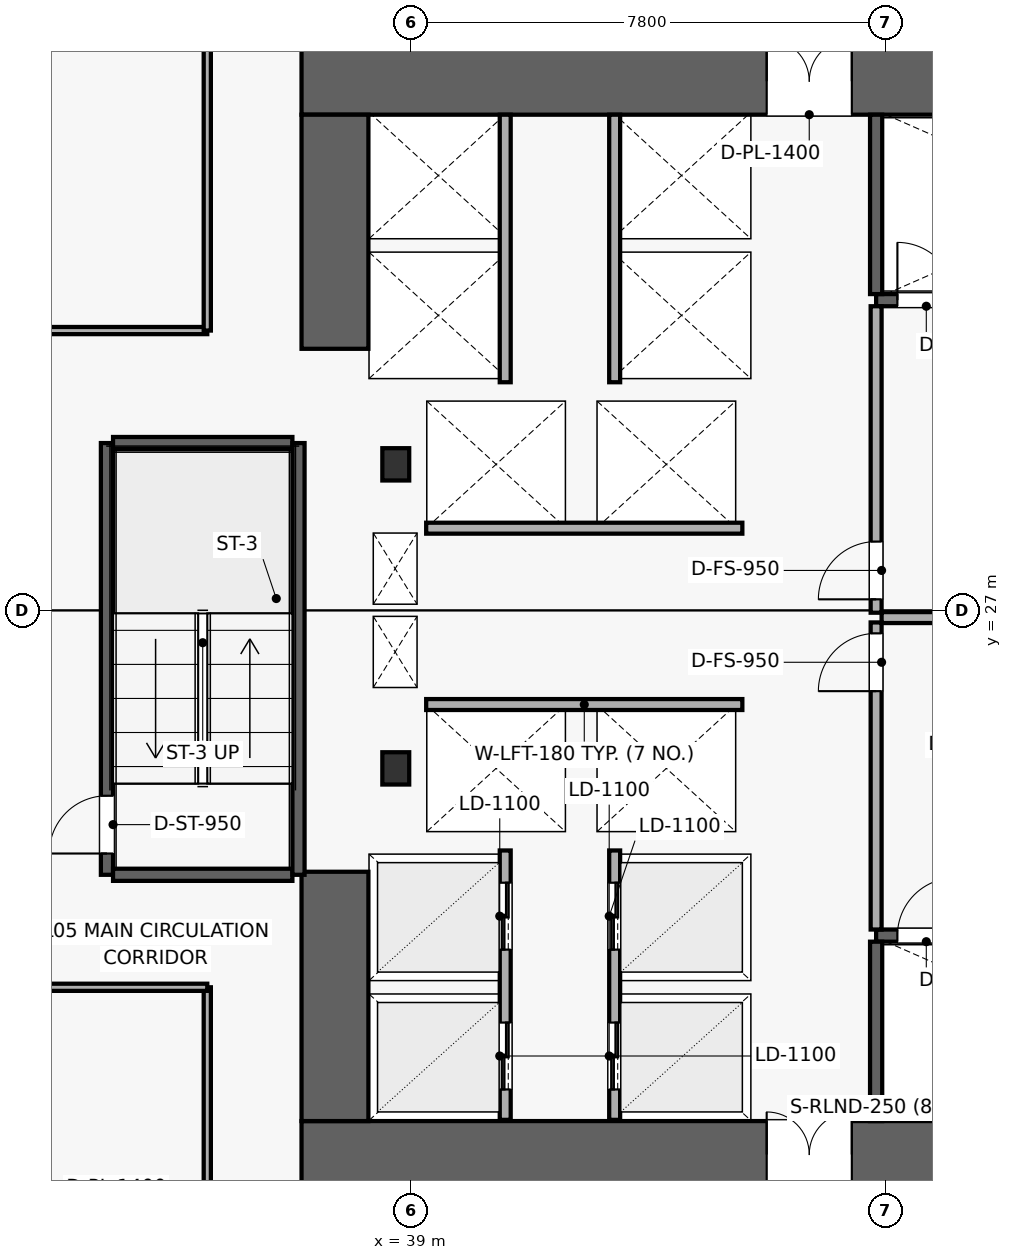
"""IFC4 building model, lengths in metres.
Left out: names, types, materials, properties, quantities, classifications, styles, units other than length and angle.
Written with IfcOpenShell. Run it as: python <this file> out.ifc"""

import sys

from ifc_helpers import new_model, si_unit, direction, frame, frame_2d, origin, origin_2d, place, context, subcontext, project, spatial, rectangle, i_section, extrude, element, fill, save


model = new_model("IFC4")
c1 = context("Model", 3, precision=1e-05, world=origin(), true_north=direction((0.0, 1.0)))
c2 = subcontext(c1, "Body", "Model", "MODEL_VIEW")
j1 = project(units=[si_unit("LENGTHUNIT", "METRE"), si_unit("PLANEANGLEUNIT", "RADIAN")], contexts=[c1])
p1 = place(None, origin())
s1 = spatial("IfcSite", under=j1, at=p1, CompositionType="ELEMENT")
p2 = place(p1, origin())
s2 = spatial("IfcBuilding", under=s1, at=p2, CompositionType="ELEMENT")
p3 = place(p2, frame((0.0, 0.0, 24.0)))
s3 = spatial("IfcBuildingStorey", under=s2, at=p3, CompositionType="ELEMENT", Elevation=24.0)
p4 = place(p3, frame((37.2, 18.05, 0.0), z_axis=(0.0, 0.0, 1.0), x_axis=(1.0, 0.0, 0.0)))
e1 = element("IfcWall", 1, at=p4, inside=s3, PredefinedType="SHEAR", context=c2, shape_type="SweptSolid", body=[
    extrude(rectangle(XDim=19.2, YDim=1.1, at=frame_2d((9.6, 0.0))), origin(), (0.0, 0.0, 1.0), 3.58),
])
p5 = place(p4, frame((7.65, 0.0, 0.0)))
e2 = element("IfcOpeningElement", 2, at=p5, cuts=e1, PredefinedType="OPENING", context=c2, shape_type="SweptSolid", body=[
    extrude(rectangle(XDim=1.4, YDim=2.15, at=frame_2d((0.7, 1.075))), frame((0.0, 0.56, 0.0), z_axis=(0.0, -1.0, 0.0), x_axis=(1.0, 0.0, 0.0)), (0.0, 0.0, 1.0), 1.12),
])
p6 = place(p3, frame((37.2, 35.7, 0.0), z_axis=(0.0, 0.0, 1.0), x_axis=(1.0, 0.0, 0.0)))
e3 = element("IfcWall", 3, at=p6, inside=s3, PredefinedType="SHEAR", context=c2, shape_type="SweptSolid", body=[
    extrude(rectangle(XDim=19.2, YDim=1.1, at=frame_2d((9.6, 0.0))), origin(), (0.0, 0.0, 1.0), 3.58),
])
p7 = place(p6, frame((7.65, 0.0, 0.0)))
e4 = element("IfcOpeningElement", 4, at=p7, cuts=e3, PredefinedType="OPENING", context=c2, shape_type="SweptSolid", body=[
    extrude(rectangle(XDim=1.4, YDim=2.15, at=frame_2d((0.7, 1.075))), frame((0.0, 0.56, 0.0), z_axis=(0.0, -1.0, 0.0), x_axis=(1.0, 0.0, 0.0)), (0.0, 0.0, 1.0), 1.12),
])
p8 = place(p3, frame((37.75, 18.6, 0.0), z_axis=(0.0, 0.0, 1.0), x_axis=(0.0, 1.0, 0.0)))
e5 = element("IfcWall", 5, at=p8, inside=s3, PredefinedType="SHEAR", context=c2, shape_type="SweptSolid", body=[
    extrude(rectangle(XDim=4.1, YDim=1.1, at=frame_2d((2.05, 0.0))), origin(), (0.0, 0.0, 1.0), 3.58),
])
p9 = place(p3, frame((37.75, 31.3, 0.0), z_axis=(0.0, 0.0, 1.0), x_axis=(0.0, 1.0, 0.0)))
e6 = element("IfcWall", 6, at=p9, inside=s3, PredefinedType="SHEAR", context=c2, shape_type="SweptSolid", body=[
    extrude(rectangle(XDim=3.85, YDim=1.1, at=frame_2d((1.925, 0.0))), origin(), (0.0, 0.0, 1.0), 3.58),
])
for number, where, z_axis, x_axis in (
    (7, (38.75, 24.4, 0.005), (0.0, 0.0, 1.0), (1.0, 0.0, 0.0)),
    (8, (38.75, 29.4, 0.005), (0.0, 0.0, 1.0), (1.0, 0.0, 0.0)),
):
    element("IfcColumn", number, at=place(p3, frame(where, z_axis=z_axis, x_axis=x_axis)), inside=s3, PredefinedType="COLUMN", context=c2, shape_type="SweptSolid", body=[
        extrude(i_section(OverallWidth=0.442, OverallDepth=0.531, WebThickness=0.066, FlangeThickness=0.106, FilletRadius=0.031, at=origin_2d()), origin(), (0.0, 0.0, 1.0), 3.795),
    ])
p10 = place(p3, frame((46.65, 21.65, 0.0), z_axis=(0.0, 0.0, 1.0), x_axis=(1.0, 0.0, 0.0)))
e9 = element("IfcWall", 9, at=p10, inside=s3, PredefinedType="SHEAR", context=c2, shape_type="SweptSolid", body=[
    extrude(rectangle(XDim=7.1, YDim=0.2, at=frame_2d((3.55, 0.0))), origin(), (0.0, 0.0, 1.0), 3.58),
])
p11 = place(p10, frame((0.35, 0.0, 0.0)))
e10 = element("IfcOpeningElement", 10, at=p11, cuts=e9, PredefinedType="OPENING", context=c2, shape_type="SweptSolid", body=[
    extrude(rectangle(XDim=0.95, YDim=2.1, at=frame_2d((0.475, 1.05))), frame((0.0, 0.11, 0.0), z_axis=(0.0, -1.0, 0.0), x_axis=(1.0, 0.0, 0.0)), (0.0, 0.0, 1.0), 0.22),
])
p12 = place(p3, frame((46.65, 18.6, 0.0), z_axis=(0.0, 0.0, 1.0), x_axis=(0.0, 1.0, 0.0)))
e11 = element("IfcWall", 11, at=p12, inside=s3, PredefinedType="SHEAR", context=c2, shape_type="SweptSolid", body=[
    extrude(rectangle(XDim=2.95, YDim=0.2, at=frame_2d((1.475, 0.0))), origin(), (0.0, 0.0, 1.0), 3.58),
])
p13 = place(p3, frame((46.65, 32.1, 0.0), z_axis=(0.0, 0.0, 1.0), x_axis=(1.0, 0.0, 0.0)))
e12 = element("IfcWall", 12, at=p13, inside=s3, PredefinedType="SHEAR", context=c2, shape_type="SweptSolid", body=[
    extrude(rectangle(XDim=7.1, YDim=0.2, at=frame_2d((3.55, 0.0))), origin(), (0.0, 0.0, 1.0), 3.58),
])
p14 = place(p13, frame((0.35, 0.0, 0.0)))
e13 = element("IfcOpeningElement", 13, at=p14, cuts=e12, PredefinedType="OPENING", context=c2, shape_type="SweptSolid", body=[
    extrude(rectangle(XDim=0.95, YDim=2.1, at=frame_2d((0.475, 1.05))), frame((0.0, 0.11, 0.0), z_axis=(0.0, -1.0, 0.0), x_axis=(1.0, 0.0, 0.0)), (0.0, 0.0, 1.0), 0.22),
])
p15 = place(p3, frame((46.65, 32.2, 0.0), z_axis=(0.0, 0.0, 1.0), x_axis=(0.0, 1.0, 0.0)))
e14 = element("IfcWall", 14, at=p15, inside=s3, PredefinedType="SHEAR", context=c2, shape_type="SweptSolid", body=[
    extrude(rectangle(XDim=2.95, YDim=0.2, at=frame_2d((1.475, 0.0))), origin(), (0.0, 0.0, 1.0), 3.58),
])
p16 = place(p3, frame((34.0, 22.65, 0.0), z_axis=(0.0, 0.0, 1.0), x_axis=(0.0, 1.0, 0.0)))
e15 = element("IfcWall", 15, at=p16, inside=s3, PredefinedType="SHEAR", context=c2, shape_type="SweptSolid", body=[
    extrude(rectangle(XDim=7.1, YDim=0.2, at=frame_2d((3.55, 0.0))), origin(), (0.0, 0.0, 1.0), 3.58),
])
p17 = place(p16, frame((0.35, 0.0, 0.0)))
e16 = element("IfcOpeningElement", 16, at=p17, cuts=e15, PredefinedType="OPENING", context=c2, shape_type="SweptSolid", body=[
    extrude(rectangle(XDim=0.95, YDim=2.1, at=frame_2d((0.475, 1.05))), frame((0.0, 0.11, 0.0), z_axis=(0.0, -1.0, 0.0), x_axis=(1.0, 0.0, 0.0)), (0.0, 0.0, 1.0), 0.22),
])
for number, where, z_axis, x_axis in (
    (17, (34.1, 22.65, 0.0), (0.0, 0.0, 1.0), (1.0, 0.0, 0.0)),
    (18, (34.1, 29.75, 0.0), (0.0, 0.0, 1.0), (1.0, 0.0, 0.0)),
):
    element("IfcWall", number, at=place(p3, frame(where, z_axis=z_axis, x_axis=x_axis)), inside=s3, PredefinedType="SHEAR", context=c2, shape_type="SweptSolid", body=[
        extrude(rectangle(XDim=2.95, YDim=0.2, at=frame_2d((1.475, 0.0))), origin(), (0.0, 0.0, 1.0), 3.58),
    ])
p18 = place(p3, frame((37.15, 22.65, 0.0), z_axis=(0.0, 0.0, 1.0), x_axis=(0.0, 1.0, 0.0)))
e19 = element("IfcWall", 19, at=p18, inside=s3, PredefinedType="SHEAR", context=c2, shape_type="SweptSolid", body=[
    extrude(rectangle(XDim=7.1, YDim=0.2, at=frame_2d((3.55, 0.0))), origin(), (0.0, 0.0, 1.0), 3.58),
])
p19 = place(p3, frame((46.74, 26.88, 0.0), z_axis=(0.0, 0.0, 1.0), x_axis=(1.0, 0.0, 0.0)))
e20 = element("IfcWall", 20, at=p19, inside=s3, PredefinedType="PARTITIONING", context=c2, shape_type="SweptSolid", body=[
    extrude(rectangle(XDim=3.17, YDim=0.18, at=frame_2d((1.585, 0.0))), origin(), (0.0, 0.0, 1.0), 3.58),
])
p20 = place(p3, frame((46.65, 21.75, 0.0), z_axis=(0.0, 0.0, 1.0), x_axis=(0.0, 1.0, 0.0)))
e21 = element("IfcWall", 21, at=p20, inside=s3, PredefinedType="PARTITIONING", context=c2, shape_type="SweptSolid", body=[
    extrude(rectangle(XDim=5.05, YDim=0.18, at=frame_2d((2.525, 0.0))), origin(), (0.0, 0.0, 1.0), 2.958),
])
p21 = place(p20, frame((3.92, 0.0, 0.0)))
e22 = element("IfcOpeningElement", 22, at=p21, cuts=e21, PredefinedType="OPENING", context=c2, shape_type="SweptSolid", body=[
    extrude(rectangle(XDim=0.95, YDim=2.1, at=frame_2d((0.475, 1.05))), frame((0.0, 0.1, 0.0), z_axis=(0.0, -1.0, 0.0), x_axis=(1.0, 0.0, 0.0)), (0.0, 0.0, 1.0), 0.2),
])
p22 = place(p3, frame((46.65, 26.96, 0.0), z_axis=(0.0, 0.0, 1.0), x_axis=(0.0, 1.0, 0.0)))
e23 = element("IfcWall", 23, at=p22, inside=s3, PredefinedType="PARTITIONING", context=c2, shape_type="SweptSolid", body=[
    extrude(rectangle(XDim=5.04, YDim=0.18, at=frame_2d((2.52, 0.0))), origin(), (0.0, 0.0, 1.0), 2.958),
])
p23 = place(p22, frame((0.22, 0.0, 0.0)))
e24 = element("IfcOpeningElement", 24, at=p23, cuts=e23, PredefinedType="OPENING", context=c2, shape_type="SweptSolid", body=[
    extrude(rectangle(XDim=0.95, YDim=2.1, at=frame_2d((0.475, 1.05))), frame((0.0, 0.1, 0.0), z_axis=(0.0, -1.0, 0.0), x_axis=(1.0, 0.0, 0.0)), (0.0, 0.0, 1.0), 0.2),
])
p24 = place(p3, frame((40.55, 18.62, 0.0), z_axis=(0.0, 0.0, 1.0), x_axis=(0.0, 1.0, 0.0)))
e25 = element("IfcWall", 25, at=p24, inside=s3, PredefinedType="SOLIDWALL", context=c2, shape_type="SweptSolid", body=[
    extrude(rectangle(XDim=4.43, YDim=0.18, at=frame_2d((2.215, 0.0))), origin(), (0.0, 0.0, 1.0), 3.58),
])
p25 = place(p24, frame((0.5, 0.0, 0.0)))
e26 = element("IfcOpeningElement", 26, at=p25, cuts=e25, PredefinedType="OPENING", context=c2, shape_type="SweptSolid", body=[
    extrude(rectangle(XDim=1.1, YDim=2.15, at=frame_2d((0.55, 1.075))), frame((0.0, 0.1, 0.0), z_axis=(0.0, -1.0, 0.0), x_axis=(1.0, 0.0, 0.0)), (0.0, 0.0, 1.0), 0.2),
])
p26 = place(p24, frame((2.8, 0.0, 0.0)))
e27 = element("IfcOpeningElement", 27, at=p26, cuts=e25, PredefinedType="OPENING", context=c2, shape_type="SweptSolid", body=[
    extrude(rectangle(XDim=1.1, YDim=2.15, at=frame_2d((0.55, 1.075))), frame((0.0, 0.1, 0.0), z_axis=(0.0, -1.0, 0.0), x_axis=(1.0, 0.0, 0.0)), (0.0, 0.0, 1.0), 0.2),
])
p27 = place(p3, frame((42.35, 18.62, 0.0), z_axis=(0.0, 0.0, 1.0), x_axis=(0.0, 1.0, 0.0)))
e28 = element("IfcWall", 28, at=p27, inside=s3, PredefinedType="SOLIDWALL", context=c2, shape_type="SweptSolid", body=[
    extrude(rectangle(XDim=4.43, YDim=0.18, at=frame_2d((2.215, 0.0))), origin(), (0.0, 0.0, 1.0), 3.58),
])
p28 = place(p27, frame((0.5, 0.0, 0.0)))
e29 = element("IfcOpeningElement", 29, at=p28, cuts=e28, PredefinedType="OPENING", context=c2, shape_type="SweptSolid", body=[
    extrude(rectangle(XDim=1.1, YDim=2.15, at=frame_2d((0.55, 1.075))), frame((0.0, 0.1, 0.0), z_axis=(0.0, -1.0, 0.0), x_axis=(1.0, 0.0, 0.0)), (0.0, 0.0, 1.0), 0.2),
])
p29 = place(p27, frame((2.8, 0.0, 0.0)))
e30 = element("IfcOpeningElement", 30, at=p29, cuts=e28, PredefinedType="OPENING", context=c2, shape_type="SweptSolid", body=[
    extrude(rectangle(XDim=1.1, YDim=2.15, at=frame_2d((0.55, 1.075))), frame((0.0, 0.1, 0.0), z_axis=(0.0, -1.0, 0.0), x_axis=(1.0, 0.0, 0.0)), (0.0, 0.0, 1.0), 0.2),
])
for number, where, z_axis, x_axis in (
    (31, (40.55, 30.75, 0.0), (0.0, 0.0, 1.0), (0.0, 1.0, 0.0)),
    (32, (42.35, 30.75, 0.0), (0.0, 0.0, 1.0), (0.0, 1.0, 0.0)),
):
    element("IfcWall", number, at=place(p3, frame(where, z_axis=z_axis, x_axis=x_axis)), inside=s3, PredefinedType="SOLIDWALL", context=c2, shape_type="SweptSolid", body=[
        extrude(rectangle(XDim=4.4, YDim=0.18, at=frame_2d((2.2, 0.0))), origin(), (0.0, 0.0, 1.0), 3.58),
    ])
for number, where, z_axis, x_axis in (
    (33, (39.25, 25.45, 0.0), (0.0, 0.0, 1.0), (1.0, 0.0, 0.0)),
    (34, (39.25, 28.35, 0.0), (0.0, 0.0, 1.0), (1.0, 0.0, 0.0)),
):
    element("IfcWall", number, at=place(p3, frame(where, z_axis=z_axis, x_axis=x_axis)), inside=s3, PredefinedType="SOLIDWALL", context=c2, shape_type="SweptSolid", body=[
        extrude(rectangle(XDim=5.2, YDim=0.18, at=frame_2d((2.6, 0.0))), origin(), (0.0, 0.0, 1.0), 3.58),
    ])
p30 = place(p3, frame((35.65, 15.85, 0.0), z_axis=(0.0, 0.0, 1.0), x_axis=(0.0, 1.0, 0.0)))
e35 = element("IfcWall", 35, at=p30, inside=s3, PredefinedType="PARTITIONING", context=c2, shape_type="SweptSolid", body=[
    extrude(rectangle(XDim=4.95, YDim=0.118, at=frame_2d((2.475, 0.0))), origin(), (0.0, 0.0, 1.0), 2.711),
])
for number, where, z_axis, x_axis in (
    (36, (35.65, 20.8, 0.0), (0.0, 0.0, 1.0), (-1.0, 0.0, 0.0)),
    (37, (32.45, 31.6, 0.0), (0.0, 0.0, 1.0), (1.0, 0.0, 0.0)),
):
    element("IfcWall", number, at=place(p3, frame(where, z_axis=z_axis, x_axis=x_axis)), inside=s3, PredefinedType="PARTITIONING", context=c2, shape_type="SweptSolid", body=[
        extrude(rectangle(XDim=3.2, YDim=0.118, at=frame_2d((1.6, 0.0))), origin(), (0.0, 0.0, 1.0), 3.28),
    ])
p31 = place(p3, frame((35.65, 31.6, 0.0), z_axis=(0.0, 0.0, 1.0), x_axis=(0.0, 1.0, 0.0)))
e38 = element("IfcWall", 38, at=p31, inside=s3, PredefinedType="PARTITIONING", context=c2, shape_type="SweptSolid", body=[
    extrude(rectangle(XDim=6.25, YDim=0.118, at=frame_2d((3.125, 0.0))), origin(), (0.0, 0.0, 1.0), 2.877),
])
p32 = place(p11, origin())
e39 = element("IfcDoor", 39, at=p32, inside=s3, OperationType="SINGLE_SWING_RIGHT", PredefinedType="DOOR", context=c2, shape_type="SweptSolid", body=[
    extrude(rectangle(XDim=0.95, YDim=2.1, at=frame_2d((0.475, 1.05))), frame((0.0, 0.025, 0.0), z_axis=(0.0, -1.0, 0.0), x_axis=(1.0, 0.0, 0.0)), (0.0, 0.0, 1.0), 0.05),
])
fill(e10, e39)
p33 = place(p14, origin())
e40 = element("IfcDoor", 40, at=p33, inside=s3, OperationType="SINGLE_SWING_LEFT", PredefinedType="DOOR", context=c2, shape_type="SweptSolid", body=[
    extrude(rectangle(XDim=0.95, YDim=2.1, at=frame_2d((0.475, 1.05))), frame((0.0, 0.025, 0.0), z_axis=(0.0, -1.0, 0.0), x_axis=(1.0, 0.0, 0.0)), (0.0, 0.0, 1.0), 0.05),
])
fill(e13, e40)
p34 = place(p17, origin())
e41 = element("IfcDoor", 41, at=p34, inside=s3, OperationType="SINGLE_SWING_LEFT", PredefinedType="DOOR", context=c2, shape_type="SweptSolid", body=[
    extrude(rectangle(XDim=0.95, YDim=2.1, at=frame_2d((0.475, 1.05))), frame((0.0, 0.025, 0.0), z_axis=(0.0, -1.0, 0.0), x_axis=(1.0, 0.0, 0.0)), (0.0, 0.0, 1.0), 0.05),
])
fill(e16, e41)
p35 = place(p21, origin())
e42 = element("IfcDoor", 42, at=p35, inside=s3, OperationType="SINGLE_SWING_LEFT", PredefinedType="DOOR", context=c2, shape_type="SweptSolid", body=[
    extrude(rectangle(XDim=0.95, YDim=2.1, at=frame_2d((0.475, 1.05))), frame((0.0, 0.025, 0.0), z_axis=(0.0, -1.0, 0.0), x_axis=(1.0, 0.0, 0.0)), (0.0, 0.0, 1.0), 0.05),
])
fill(e22, e42)
p36 = place(p23, origin())
e43 = element("IfcDoor", 43, at=p36, inside=s3, OperationType="SINGLE_SWING_LEFT", PredefinedType="DOOR", context=c2, shape_type="SweptSolid", body=[
    extrude(rectangle(XDim=0.95, YDim=2.1, at=frame_2d((0.475, 1.05))), frame((0.0, 0.025, 0.0), z_axis=(0.0, -1.0, 0.0), x_axis=(1.0, 0.0, 0.0)), (0.0, 0.0, 1.0), 0.05),
])
fill(e24, e43)
p37 = place(p5, origin())
e44 = element("IfcDoor", 44, at=p37, inside=s3, OperationType="DOUBLE_DOOR_SINGLE_SWING", PredefinedType="DOOR", context=c2, shape_type="SweptSolid", body=[
    extrude(rectangle(XDim=1.4, YDim=2.15, at=frame_2d((0.7, 1.075))), frame((0.0, 0.025, 0.0), z_axis=(0.0, -1.0, 0.0), x_axis=(1.0, 0.0, 0.0)), (0.0, 0.0, 1.0), 0.05),
])
fill(e2, e44)
p38 = place(p7, origin())
e45 = element("IfcDoor", 45, at=p38, inside=s3, OperationType="DOUBLE_DOOR_SINGLE_SWING", PredefinedType="DOOR", context=c2, shape_type="SweptSolid", body=[
    extrude(rectangle(XDim=1.4, YDim=2.15, at=frame_2d((0.7, 1.075))), frame((0.0, 0.025, 0.0), z_axis=(0.0, -1.0, 0.0), x_axis=(1.0, 0.0, 0.0)), (0.0, 0.0, 1.0), 0.05),
])
fill(e4, e45)
p39 = place(p25, origin())
e46 = element("IfcDoor", 46, at=p39, inside=s3, OperationType="DOUBLE_DOOR_SLIDING", PredefinedType="DOOR", context=c2, shape_type="SweptSolid", body=[
    extrude(rectangle(XDim=1.1, YDim=2.15, at=frame_2d((0.55, 1.075))), frame((0.0, 0.025, 0.0), z_axis=(0.0, -1.0, 0.0), x_axis=(1.0, 0.0, 0.0)), (0.0, 0.0, 1.0), 0.05),
])
fill(e26, e46)
p40 = place(p26, origin())
e47 = element("IfcDoor", 47, at=p40, inside=s3, OperationType="DOUBLE_DOOR_SLIDING", PredefinedType="DOOR", context=c2, shape_type="SweptSolid", body=[
    extrude(rectangle(XDim=1.1, YDim=2.15, at=frame_2d((0.55, 1.075))), frame((0.0, 0.025, 0.0), z_axis=(0.0, -1.0, 0.0), x_axis=(1.0, 0.0, 0.0)), (0.0, 0.0, 1.0), 0.05),
])
fill(e27, e47)
p41 = place(p28, origin())
e48 = element("IfcDoor", 48, at=p41, inside=s3, OperationType="DOUBLE_DOOR_SLIDING", PredefinedType="DOOR", context=c2, shape_type="SweptSolid", body=[
    extrude(rectangle(XDim=1.1, YDim=2.15, at=frame_2d((0.55, 1.075))), frame((0.0, 0.025, 0.0), z_axis=(0.0, -1.0, 0.0), x_axis=(1.0, 0.0, 0.0)), (0.0, 0.0, 1.0), 0.05),
])
fill(e29, e48)
p42 = place(p29, origin())
e49 = element("IfcDoor", 49, at=p42, inside=s3, OperationType="DOUBLE_DOOR_SLIDING", PredefinedType="DOOR", context=c2, shape_type="SweptSolid", body=[
    extrude(rectangle(XDim=1.1, YDim=2.15, at=frame_2d((0.55, 1.075))), frame((0.0, 0.025, 0.0), z_axis=(0.0, -1.0, 0.0), x_axis=(1.0, 0.0, 0.0)), (0.0, 0.0, 1.0), 0.05),
])
fill(e30, e49)
save(model, sys.argv[1])
